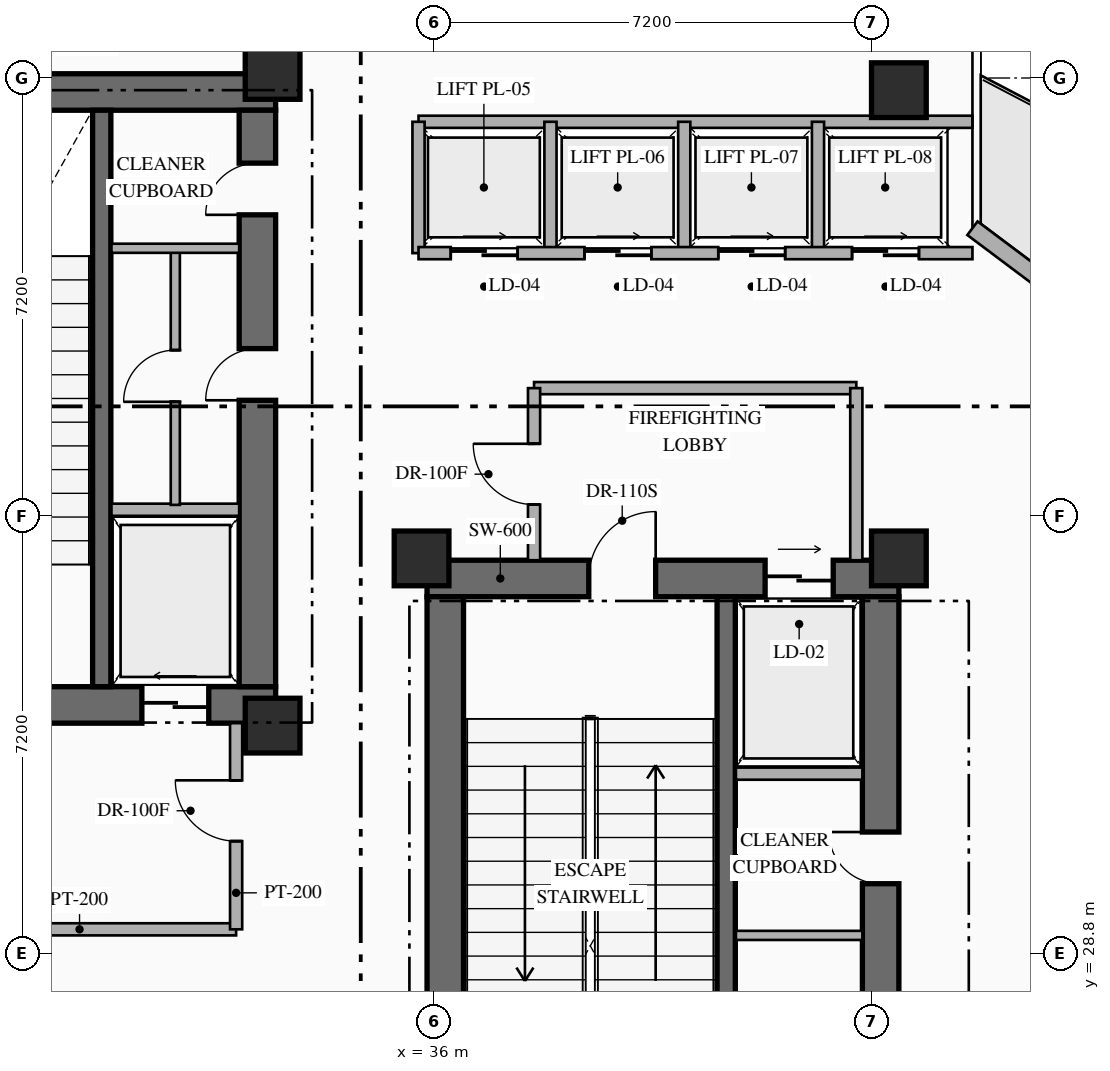
"""IFC4 building model, lengths in metres.
Left out: names, types, materials, properties, quantities, classifications, styles, units other than length and angle.
Written with IfcOpenShell. Run it as: python <this file> out.ifc"""

import sys

from ifc_helpers import new_model, si_unit, direction, frame, frame_2d, origin, origin_2d, place, context, subcontext, project, spatial, rectangle, extrude, element, fill, save


model = new_model("IFC4")
c1 = context("Model", 3, precision=1e-05, world=origin(), true_north=direction((0.0, 1.0)))
c2 = subcontext(c1, "Body", "Model", "MODEL_VIEW")
j1 = project(units=[si_unit("LENGTHUNIT", "METRE"), si_unit("PLANEANGLEUNIT", "RADIAN")], contexts=[c1])
p1 = place(None, origin())
s1 = spatial("IfcSite", under=j1, at=p1, CompositionType="ELEMENT")
p2 = place(p1, origin())
s2 = spatial("IfcBuilding", under=s1, at=p2, CompositionType="ELEMENT")
p3 = place(p2, frame((0.0, 0.0, 96.45)))
s3 = spatial("IfcBuildingStorey", under=s2, at=p3, CompositionType="ELEMENT", Elevation=96.45)
p4 = place(p3, frame((25.62, 32.89, 0.0), z_axis=(0.0, 0.0, 1.0), x_axis=(1.0, 0.0, 0.0)))
e1 = element("IfcWall", 1, at=p4, inside=s3, PredefinedType="SHEAR", context=c2, shape_type="SweptSolid", body=[
    extrude(rectangle(XDim=7.78, YDim=0.6, at=frame_2d((3.89, 0.0))), origin(), (0.0, 0.0, 1.0), 4.8),
])
p5 = place(p4, frame((2.83, 0.0, 0.0)))
e2 = element("IfcOpeningElement", 2, at=p5, cuts=e1, PredefinedType="OPENING", context=c2, shape_type="SweptSolid", body=[
    extrude(rectangle(XDim=1.1, YDim=2.2, at=frame_2d((0.55, 1.1))), frame((0.0, 0.31, 0.0), z_axis=(0.0, -1.0, 0.0), x_axis=(1.0, 0.0, 0.0)), (0.0, 0.0, 1.0), 0.62),
])
p6 = place(p4, frame((5.58, 0.0, 0.0)))
e3 = element("IfcOpeningElement", 3, at=p6, cuts=e1, PredefinedType="OPENING", context=c2, shape_type="SweptSolid", body=[
    extrude(rectangle(XDim=1.1, YDim=2.15, at=frame_2d((0.55, 1.075))), frame((0.0, 0.31, 0.0), z_axis=(0.0, -1.0, 0.0), x_axis=(1.0, 0.0, 0.0)), (0.0, 0.0, 1.0), 0.62),
])
p7 = place(p3, frame((25.62, 42.97, 0.0), z_axis=(0.0, 0.0, 1.0), x_axis=(1.0, 0.0, 0.0)))
e4 = element("IfcWall", 4, at=p7, inside=s3, PredefinedType="SHEAR", context=c2, shape_type="SweptSolid", body=[
    extrude(rectangle(XDim=7.78, YDim=0.6, at=frame_2d((3.89, 0.0))), origin(), (0.0, 0.0, 1.0), 4.8),
])
p8 = place(p3, frame((33.1, 33.19, 0.0), z_axis=(0.0, 0.0, 1.0), x_axis=(0.0, 1.0, 0.0)))
e5 = element("IfcWall", 5, at=p8, inside=s3, PredefinedType="SHEAR", context=c2, shape_type="SweptSolid", body=[
    extrude(rectangle(XDim=9.48, YDim=0.6, at=frame_2d((4.74, 0.0))), origin(), (0.0, 0.0, 1.0), 4.8),
])
p9 = place(p8, frame((4.71, 0.0, 0.0)))
e6 = element("IfcOpeningElement", 6, at=p9, cuts=e5, PredefinedType="OPENING", context=c2, shape_type="SweptSolid", body=[
    extrude(rectangle(XDim=0.85, YDim=2.08, at=frame_2d((0.425, 1.04))), frame((0.0, 0.31, 0.0), z_axis=(0.0, -1.0, 0.0), x_axis=(1.0, 0.0, 0.0)), (0.0, 0.0, 1.0), 0.62),
])
p10 = place(p8, frame((7.76, 0.0, 0.0)))
e7 = element("IfcOpeningElement", 7, at=p10, cuts=e5, PredefinedType="OPENING", context=c2, shape_type="SweptSolid", body=[
    extrude(rectangle(XDim=0.85, YDim=2.08, at=frame_2d((0.425, 1.04))), frame((0.0, 0.31, 0.0), z_axis=(0.0, -1.0, 0.0), x_axis=(1.0, 0.0, 0.0)), (0.0, 0.0, 1.0), 0.62),
])
p11 = place(p3, frame((30.54, 33.19, 0.0), z_axis=(0.0, 0.0, 1.0), x_axis=(0.0, 1.0, 0.0)))
e8 = element("IfcWall", 8, at=p11, inside=s3, PredefinedType="SHEAR", context=c2, shape_type="SweptSolid", body=[
    extrude(rectangle(XDim=9.48, YDim=0.3, at=frame_2d((4.74, 0.0))), origin(), (0.0, 0.0, 1.0), 4.8),
])
p12 = place(p3, frame((35.89, 34.97, 0.0), z_axis=(0.0, 0.0, 1.0), x_axis=(1.0, 0.0, 0.0)))
e9 = element("IfcWall", 9, at=p12, inside=s3, PredefinedType="SHEAR", context=c2, shape_type="SweptSolid", body=[
    extrude(rectangle(XDim=7.76, YDim=0.6, at=frame_2d((3.88, 0.0))), origin(), (0.0, 0.0, 1.0), 4.8),
])
p13 = place(p12, frame((2.66, 0.0, 0.0)))
e10 = element("IfcOpeningElement", 10, at=p13, cuts=e9, PredefinedType="OPENING", context=c2, shape_type="SweptSolid", body=[
    extrude(rectangle(XDim=1.1, YDim=2.2, at=frame_2d((0.55, 1.1))), frame((0.0, 0.31, 0.0), z_axis=(0.0, -1.0, 0.0), x_axis=(1.0, 0.0, 0.0)), (0.0, 0.0, 1.0), 0.62),
])
p14 = place(p12, frame((5.56, 0.0, 0.0)))
e11 = element("IfcOpeningElement", 11, at=p14, cuts=e9, PredefinedType="OPENING", context=c2, shape_type="SweptSolid", body=[
    extrude(rectangle(XDim=1.12, YDim=2.15, at=frame_2d((0.56, 1.075))), frame((0.0, 0.31, 0.0), z_axis=(0.0, -1.0, 0.0), x_axis=(1.0, 0.0, 0.0)), (0.0, 0.0, 1.0), 0.62),
])
p15 = place(p3, frame((36.19, 25.19, 0.0), z_axis=(0.0, 0.0, 1.0), x_axis=(0.0, 1.0, 0.0)))
e12 = element("IfcWall", 12, at=p15, inside=s3, PredefinedType="SHEAR", context=c2, shape_type="SweptSolid", body=[
    extrude(rectangle(XDim=9.48, YDim=0.6, at=frame_2d((4.74, 0.0))), origin(), (0.0, 0.0, 1.0), 4.8),
])
p16 = place(p3, frame((43.35, 25.19, 0.0), z_axis=(0.0, 0.0, 1.0), x_axis=(0.0, 1.0, 0.0)))
e13 = element("IfcWall", 13, at=p16, inside=s3, PredefinedType="SHEAR", context=c2, shape_type="SweptSolid", body=[
    extrude(rectangle(XDim=9.48, YDim=0.6, at=frame_2d((4.74, 0.0))), origin(), (0.0, 0.0, 1.0), 4.8),
])
p17 = place(p16, frame((1.51, 0.0, 0.0)))
e14 = element("IfcOpeningElement", 14, at=p17, cuts=e13, PredefinedType="OPENING", context=c2, shape_type="SweptSolid", body=[
    extrude(rectangle(XDim=0.85, YDim=2.08, at=frame_2d((0.425, 1.04))), frame((0.0, 0.31, 0.0), z_axis=(0.0, -1.0, 0.0), x_axis=(1.0, 0.0, 0.0)), (0.0, 0.0, 1.0), 0.62),
])
p18 = place(p16, frame((4.76, 0.0, 0.0)))
e15 = element("IfcOpeningElement", 15, at=p18, cuts=e13, PredefinedType="OPENING", context=c2, shape_type="SweptSolid", body=[
    extrude(rectangle(XDim=0.85, YDim=2.08, at=frame_2d((0.425, 1.04))), frame((0.0, 0.31, 0.0), z_axis=(0.0, -1.0, 0.0), x_axis=(1.0, 0.0, 0.0)), (0.0, 0.0, 1.0), 0.62),
])
p19 = place(p3, frame((40.81, 25.19, 0.0), z_axis=(0.0, 0.0, 1.0), x_axis=(0.0, 1.0, 0.0)))
e16 = element("IfcWall", 16, at=p19, inside=s3, PredefinedType="SHEAR", context=c2, shape_type="SweptSolid", body=[
    extrude(rectangle(XDim=9.48, YDim=0.3, at=frame_2d((4.74, 0.0))), origin(), (0.0, 0.0, 1.0), 4.8),
])
for number, where, z_axis, x_axis in (
    (17, (33.35, 32.55, 0.0), (0.0, 0.0, 1.0), (1.0, 0.0, 0.0)),
    (18, (33.35, 43.3, 0.0), (0.0, 0.0, 1.0), (1.0, 0.0, 0.0)),
    (19, (35.8, 35.3, 0.0), (0.0, 0.0, 1.0), (1.0, 0.0, 0.0)),
    (20, (43.65, 35.3, 0.0), (0.0, 0.0, 1.0), (1.0, 0.0, 0.0)),
    (21, (43.65, 43.0, 0.0), (0.0, 0.0, 1.0), (1.0, 0.0, 0.0)),
):
    element("IfcColumn", number, at=place(p3, frame(where, z_axis=z_axis, x_axis=x_axis)), inside=s3, PredefinedType="COLUMN", context=c2, shape_type="SweptSolid", body=[
        extrude(rectangle(XDim=0.9, YDim=0.9, at=origin_2d()), origin(), (0.0, 0.0, 1.0), 4.8),
    ])
p20 = place(p3, frame((44.86, 40.73, 0.0), z_axis=(0.0, 0.0, 1.0), x_axis=(0.800006902154, -0.599990797017, 0.0)))
e22 = element("IfcWall", 22, at=p20, inside=s3, PredefinedType="STANDARD", context=c2, shape_type="SweptSolid", body=[
    extrude(rectangle(XDim=29.712, YDim=0.28, at=frame_2d((14.856, 0.0))), origin(), (0.0, 0.0, 1.0), 4.55),
])
p21 = place(p20, frame((14.249, 0.0, 0.0)))
e23 = element("IfcOpeningElement", 23, at=p21, cuts=e22, PredefinedType="OPENING", context=c2, shape_type="SweptSolid", body=[
    extrude(rectangle(XDim=1.1, YDim=2.2, at=frame_2d((0.55, 1.1))), frame((0.0, 0.15, 0.0), z_axis=(0.0, -1.0, 0.0), x_axis=(1.0, 0.0, 0.0)), (0.0, 0.0, 1.0), 0.3),
])
p22 = place(p20, frame((6.528, 0.0, 0.85)))
e24 = element("IfcOpeningElement", 24, at=p22, cuts=e22, PredefinedType="OPENING", context=c2, shape_type="SweptSolid", body=[
    extrude(rectangle(XDim=1.8, YDim=2.1, at=frame_2d((0.9, 1.05))), frame((0.0, 0.15, 0.0), z_axis=(0.0, -1.0, 0.0), x_axis=(1.0, 0.0, 0.0)), (0.0, 0.0, 1.0), 0.3),
])
p23 = place(p20, frame((21.384, 0.0, 0.85)))
e25 = element("IfcOpeningElement", 25, at=p23, cuts=e22, PredefinedType="OPENING", context=c2, shape_type="SweptSolid", body=[
    extrude(rectangle(XDim=1.8, YDim=2.1, at=frame_2d((0.9, 1.05))), frame((0.0, 0.15, 0.0), z_axis=(0.0, -1.0, 0.0), x_axis=(1.0, 0.0, 0.0)), (0.0, 0.0, 1.0), 0.3),
])
p24 = place(p3, frame((30.7, 36.1, 0.0), z_axis=(0.0, 0.0, 1.0), x_axis=(1.0, 0.0, 0.0)))
e26 = element("IfcWall", 26, at=p24, inside=s3, PredefinedType="STANDARD", context=c2, shape_type="SweptSolid", body=[
    extrude(rectangle(XDim=2.1, YDim=0.2, at=frame_2d((1.05, 0.0))), origin(), (0.0, 0.0, 1.0), 4.55),
])
p25 = place(p3, frame((31.75, 36.18, 0.0), z_axis=(0.0, 0.0, 1.0), x_axis=(0.0, 1.0, 0.0)))
e27 = element("IfcWall", 27, at=p25, inside=s3, PredefinedType="PARTITIONING", context=c2, shape_type="SweptSolid", body=[
    extrude(rectangle(XDim=4.24, YDim=0.15, at=frame_2d((2.12, 0.0))), origin(), (0.0, 0.0, 1.0), 4.55),
])
p26 = place(p25, frame((1.695, 0.0, 0.0)))
e28 = element("IfcOpeningElement", 28, at=p26, cuts=e27, PredefinedType="OPENING", context=c2, shape_type="SweptSolid", body=[
    extrude(rectangle(XDim=0.85, YDim=2.08, at=frame_2d((0.425, 1.04))), frame((0.0, 0.085, 0.0), z_axis=(0.0, -1.0, 0.0), x_axis=(1.0, 0.0, 0.0)), (0.0, 0.0, 1.0), 0.17),
])
p27 = place(p3, frame((30.7, 40.4, 0.0), z_axis=(0.0, 0.0, 1.0), x_axis=(1.0, 0.0, 0.0)))
e29 = element("IfcWall", 29, at=p27, inside=s3, PredefinedType="PARTITIONING", context=c2, shape_type="SweptSolid", body=[
    extrude(rectangle(XDim=2.1, YDim=0.15, at=frame_2d((1.05, 0.0))), origin(), (0.0, 0.0, 1.0), 4.55),
])
p28 = place(p3, frame((40.97, 31.76, 0.0), z_axis=(0.0, 0.0, 1.0), x_axis=(1.0, 0.0, 0.0)))
e30 = element("IfcWall", 30, at=p28, inside=s3, PredefinedType="STANDARD", context=c2, shape_type="SweptSolid", body=[
    extrude(rectangle(XDim=2.08, YDim=0.2, at=frame_2d((1.04, 0.0))), origin(), (0.0, 0.0, 1.0), 4.55),
])
p29 = place(p3, frame((40.97, 29.1, 0.0), z_axis=(0.0, 0.0, 1.0), x_axis=(1.0, 0.0, 0.0)))
e31 = element("IfcWall", 31, at=p29, inside=s3, PredefinedType="PARTITIONING", context=c2, shape_type="SweptSolid", body=[
    extrude(rectangle(XDim=2.08, YDim=0.15, at=frame_2d((1.04, 0.0))), origin(), (0.0, 0.0, 1.0), 4.55),
])
p30 = place(p3, frame((27.6, 29.2, 0.0), z_axis=(0.0, 0.0, 1.0), x_axis=(1.0, 0.0, 0.0)))
e32 = element("IfcWall", 32, at=p30, inside=s3, PredefinedType="STANDARD", context=c2, shape_type="SweptSolid", body=[
    extrude(rectangle(XDim=5.15, YDim=0.2, at=frame_2d((2.575, 0.0))), origin(), (0.0, 0.0, 1.0), 4.55),
])
p31 = place(p3, frame((32.75, 29.2, 0.0), z_axis=(0.0, 0.0, 1.0), x_axis=(0.0, 1.0, 0.0)))
e33 = element("IfcWall", 33, at=p31, inside=s3, PredefinedType="STANDARD", context=c2, shape_type="SweptSolid", body=[
    extrude(rectangle(XDim=3.39, YDim=0.2, at=frame_2d((1.695, 0.0))), origin(), (0.0, 0.0, 1.0), 4.55),
])
p32 = place(p31, frame((1.45, 0.0, 0.0)))
e34 = element("IfcOpeningElement", 34, at=p32, cuts=e33, PredefinedType="OPENING", context=c2, shape_type="SweptSolid", body=[
    extrude(rectangle(XDim=1.0, YDim=2.2, at=frame_2d((0.5, 1.1))), frame((0.0, 0.11, 0.0), z_axis=(0.0, -1.0, 0.0), x_axis=(1.0, 0.0, 0.0)), (0.0, 0.0, 1.0), 0.22),
])
p33 = place(p3, frame((37.65, 38.1, 0.0), z_axis=(0.0, 0.0, 1.0), x_axis=(1.0, 0.0, 0.0)))
e35 = element("IfcWall", 35, at=p33, inside=s3, PredefinedType="STANDARD", context=c2, shape_type="SweptSolid", body=[
    extrude(rectangle(XDim=5.3, YDim=0.2, at=frame_2d((2.65, 0.0))), origin(), (0.0, 0.0, 1.0), 4.55),
])
p34 = place(p3, frame((42.95, 35.27, 0.0), z_axis=(0.0, 0.0, 1.0), x_axis=(0.0, 1.0, 0.0)))
e36 = element("IfcWall", 36, at=p34, inside=s3, PredefinedType="STANDARD", context=c2, shape_type="SweptSolid", body=[
    extrude(rectangle(XDim=2.83, YDim=0.2, at=frame_2d((1.415, 0.0))), origin(), (0.0, 0.0, 1.0), 4.55),
])
p35 = place(p3, frame((37.65, 35.27, 0.0), z_axis=(0.0, 0.0, 1.0), x_axis=(0.0, 1.0, 0.0)))
e37 = element("IfcWall", 37, at=p35, inside=s3, PredefinedType="STANDARD", context=c2, shape_type="SweptSolid", body=[
    extrude(rectangle(XDim=2.83, YDim=0.2, at=frame_2d((1.415, 0.0))), origin(), (0.0, 0.0, 1.0), 4.55),
])
p36 = place(p35, frame((0.915, 0.0, 0.0)))
e38 = element("IfcOpeningElement", 38, at=p36, cuts=e37, PredefinedType="OPENING", context=c2, shape_type="SweptSolid", body=[
    extrude(rectangle(XDim=1.0, YDim=2.2, at=frame_2d((0.5, 1.1))), frame((0.0, 0.11, 0.0), z_axis=(0.0, -1.0, 0.0), x_axis=(1.0, 0.0, 0.0)), (0.0, 0.0, 1.0), 0.22),
])
p37 = place(p3, frame((35.75, 42.48, 0.0), z_axis=(0.0, 0.0, 1.0), x_axis=(1.0, 0.0, 0.0)))
e39 = element("IfcWall", 39, at=p37, inside=s3, PredefinedType="STANDARD", context=c2, shape_type="SweptSolid", body=[
    extrude(rectangle(XDim=9.11, YDim=0.2, at=frame_2d((4.555, 0.0))), origin(), (0.0, 0.0, 1.0), 4.55),
])
for number, where, z_axis, x_axis in (
    (40, (35.75, 40.32, 0.0), (0.0, 0.0, 1.0), (0.0, 1.0, 0.0)),
    (41, (37.92, 40.32, 0.0), (0.0, 0.0, 1.0), (0.0, 1.0, 0.0)),
    (42, (40.12, 40.32, 0.0), (0.0, 0.0, 1.0), (0.0, 1.0, 0.0)),
    (43, (42.32, 40.32, 0.0), (0.0, 0.0, 1.0), (0.0, 1.0, 0.0)),
):
    element("IfcWall", number, at=place(p3, frame(where, z_axis=z_axis, x_axis=x_axis)), inside=s3, PredefinedType="STANDARD", context=c2, shape_type="SweptSolid", body=[
        extrude(rectangle(XDim=2.16, YDim=0.2, at=frame_2d((1.08, 0.0))), origin(), (0.0, 0.0, 1.0), 4.55),
    ])
p38 = place(p3, frame((35.75, 40.32, 0.0), z_axis=(0.0, 0.0, 1.0), x_axis=(1.0, 0.0, 0.0)))
e44 = element("IfcWall", 44, at=p38, inside=s3, PredefinedType="STANDARD", context=c2, shape_type="SweptSolid", body=[
    extrude(rectangle(XDim=9.11, YDim=0.2, at=frame_2d((4.555, 0.0))), origin(), (0.0, 0.0, 1.0), 4.55),
])
p39 = place(p38, frame((0.53, 0.0, 0.0)))
e45 = element("IfcOpeningElement", 45, at=p39, cuts=e44, PredefinedType="OPENING", context=c2, shape_type="SweptSolid", body=[
    extrude(rectangle(XDim=1.1, YDim=2.18, at=frame_2d((0.55, 1.09))), frame((0.0, 0.11, 0.0), z_axis=(0.0, -1.0, 0.0), x_axis=(1.0, 0.0, 0.0)), (0.0, 0.0, 1.0), 0.22),
])
p40 = place(p38, frame((2.73, 0.0, 0.0)))
e46 = element("IfcOpeningElement", 46, at=p40, cuts=e44, PredefinedType="OPENING", context=c2, shape_type="SweptSolid", body=[
    extrude(rectangle(XDim=1.1, YDim=2.18, at=frame_2d((0.55, 1.09))), frame((0.0, 0.11, 0.0), z_axis=(0.0, -1.0, 0.0), x_axis=(1.0, 0.0, 0.0)), (0.0, 0.0, 1.0), 0.22),
])
p41 = place(p38, frame((4.93, 0.0, 0.0)))
e47 = element("IfcOpeningElement", 47, at=p41, cuts=e44, PredefinedType="OPENING", context=c2, shape_type="SweptSolid", body=[
    extrude(rectangle(XDim=1.1, YDim=2.18, at=frame_2d((0.55, 1.09))), frame((0.0, 0.11, 0.0), z_axis=(0.0, -1.0, 0.0), x_axis=(1.0, 0.0, 0.0)), (0.0, 0.0, 1.0), 0.22),
])
p42 = place(p38, frame((7.13, 0.0, 0.0)))
e48 = element("IfcOpeningElement", 48, at=p42, cuts=e44, PredefinedType="OPENING", context=c2, shape_type="SweptSolid", body=[
    extrude(rectangle(XDim=1.1, YDim=2.18, at=frame_2d((0.55, 1.09))), frame((0.0, 0.11, 0.0), z_axis=(0.0, -1.0, 0.0), x_axis=(1.0, 0.0, 0.0)), (0.0, 0.0, 1.0), 0.22),
])
p43 = place(p3, frame((45.32, 22.56, 0.0), z_axis=(0.0, 0.0, 1.0), x_axis=(0.599997279769, 0.800002040166, 0.0)))
e49 = element("IfcWall", 49, at=p43, inside=s3, PredefinedType="PARTITIONING", context=c2, shape_type="SweptSolid", body=[
    extrude(rectangle(XDim=14.36, YDim=0.15, at=frame_2d((7.18, 0.0))), origin(), (0.0, 0.0, 1.0), 4.55),
])
p44 = place(p43, frame((6.705, 0.0, 0.0)))
e50 = element("IfcOpeningElement", 50, at=p44, cuts=e49, PredefinedType="OPENING", context=c2, shape_type="SweptSolid", body=[
    extrude(rectangle(XDim=0.95, YDim=2.15, at=frame_2d((0.475, 1.075))), frame((0.0, 0.085, 0.0), z_axis=(0.0, -1.0, 0.0), x_axis=(1.0, 0.0, 0.0)), (0.0, 0.0, 1.0), 0.17),
])
p45 = place(p6, origin())
e51 = element("IfcDoor", 51, at=p45, inside=s3, OperationType="SLIDING_TO_LEFT", PredefinedType="USERDEFINED", context=c2, shape_type="SweptSolid", body=[
    extrude(rectangle(XDim=1.1, YDim=2.15, at=frame_2d((0.55, 1.075))), frame((0.0, 0.025, 0.0), z_axis=(0.0, -1.0, 0.0), x_axis=(1.0, 0.0, 0.0)), (0.0, 0.0, 1.0), 0.05),
])
fill(e3, e51)
p46 = place(p13, origin())
e52 = element("IfcDoor", 52, at=p46, inside=s3, OperationType="SINGLE_SWING_RIGHT", PredefinedType="DOOR", context=c2, shape_type="SweptSolid", body=[
    extrude(rectangle(XDim=1.1, YDim=2.2, at=frame_2d((0.55, 1.1))), frame((0.0, 0.025, 0.0), z_axis=(0.0, -1.0, 0.0), x_axis=(1.0, 0.0, 0.0)), (0.0, 0.0, 1.0), 0.05),
])
fill(e10, e52)
p47 = place(p14, origin())
e53 = element("IfcDoor", 53, at=p47, inside=s3, OperationType="SLIDING_TO_RIGHT", PredefinedType="USERDEFINED", context=c2, shape_type="SweptSolid", body=[
    extrude(rectangle(XDim=1.12, YDim=2.15, at=frame_2d((0.56, 1.075))), frame((0.0, 0.025, 0.0), z_axis=(0.0, -1.0, 0.0), x_axis=(1.0, 0.0, 0.0)), (0.0, 0.0, 1.0), 0.05),
])
fill(e11, e53)
p48 = place(p9, origin())
e54 = element("IfcDoor", 54, at=p48, inside=s3, OperationType="SINGLE_SWING_LEFT", PredefinedType="DOOR", context=c2, shape_type="SweptSolid", body=[
    extrude(rectangle(XDim=0.85, YDim=2.08, at=frame_2d((0.425, 1.04))), frame((0.0, 0.025, 0.0), z_axis=(0.0, -1.0, 0.0), x_axis=(1.0, 0.0, 0.0)), (0.0, 0.0, 1.0), 0.05),
])
fill(e6, e54)
p49 = place(p10, origin())
e55 = element("IfcDoor", 55, at=p49, inside=s3, OperationType="SINGLE_SWING_LEFT", PredefinedType="DOOR", context=c2, shape_type="SweptSolid", body=[
    extrude(rectangle(XDim=0.85, YDim=2.08, at=frame_2d((0.425, 1.04))), frame((0.0, 0.025, 0.0), z_axis=(0.0, -1.0, 0.0), x_axis=(1.0, 0.0, 0.0)), (0.0, 0.0, 1.0), 0.05),
])
fill(e7, e55)
p50 = place(p18, origin())
e56 = element("IfcDoor", 56, at=p50, inside=s3, OperationType="SINGLE_SWING_RIGHT", PredefinedType="DOOR", context=c2, shape_type="SweptSolid", body=[
    extrude(rectangle(XDim=0.85, YDim=2.08, at=frame_2d((0.425, 1.04))), frame((0.0, 0.025, 0.0), z_axis=(0.0, -1.0, 0.0), x_axis=(1.0, 0.0, 0.0)), (0.0, 0.0, 1.0), 0.05),
])
fill(e15, e56)
p51 = place(p26, origin())
e57 = element("IfcDoor", 57, at=p51, inside=s3, OperationType="SINGLE_SWING_LEFT", PredefinedType="DOOR", context=c2, shape_type="SweptSolid", body=[
    extrude(rectangle(XDim=0.85, YDim=2.08, at=frame_2d((0.425, 1.04))), frame((0.0, 0.025, 0.0), z_axis=(0.0, -1.0, 0.0), x_axis=(1.0, 0.0, 0.0)), (0.0, 0.0, 1.0), 0.05),
])
fill(e28, e57)
p52 = place(p32, origin())
e58 = element("IfcDoor", 58, at=p52, inside=s3, OperationType="SINGLE_SWING_RIGHT", PredefinedType="DOOR", context=c2, shape_type="SweptSolid", body=[
    extrude(rectangle(XDim=1.0, YDim=2.2, at=frame_2d((0.5, 1.1))), frame((0.0, 0.025, 0.0), z_axis=(0.0, -1.0, 0.0), x_axis=(1.0, 0.0, 0.0)), (0.0, 0.0, 1.0), 0.05),
])
fill(e34, e58)
p53 = place(p36, origin())
e59 = element("IfcDoor", 59, at=p53, inside=s3, OperationType="SINGLE_SWING_RIGHT", PredefinedType="DOOR", context=c2, shape_type="SweptSolid", body=[
    extrude(rectangle(XDim=1.0, YDim=2.2, at=frame_2d((0.5, 1.1))), frame((0.0, 0.025, 0.0), z_axis=(0.0, -1.0, 0.0), x_axis=(1.0, 0.0, 0.0)), (0.0, 0.0, 1.0), 0.05),
])
fill(e38, e59)
p54 = place(p39, origin())
e60 = element("IfcDoor", 60, at=p54, inside=s3, OperationType="SLIDING_TO_RIGHT", PredefinedType="USERDEFINED", context=c2, shape_type="SweptSolid", body=[
    extrude(rectangle(XDim=1.1, YDim=2.18, at=frame_2d((0.55, 1.09))), frame((0.0, 0.025, 0.0), z_axis=(0.0, -1.0, 0.0), x_axis=(1.0, 0.0, 0.0)), (0.0, 0.0, 1.0), 0.05),
])
fill(e45, e60)
p55 = place(p40, origin())
e61 = element("IfcDoor", 61, at=p55, inside=s3, OperationType="SLIDING_TO_RIGHT", PredefinedType="USERDEFINED", context=c2, shape_type="SweptSolid", body=[
    extrude(rectangle(XDim=1.1, YDim=2.18, at=frame_2d((0.55, 1.09))), frame((0.0, 0.025, 0.0), z_axis=(0.0, -1.0, 0.0), x_axis=(1.0, 0.0, 0.0)), (0.0, 0.0, 1.0), 0.05),
])
fill(e46, e61)
p56 = place(p41, origin())
e62 = element("IfcDoor", 62, at=p56, inside=s3, OperationType="SLIDING_TO_RIGHT", PredefinedType="USERDEFINED", context=c2, shape_type="SweptSolid", body=[
    extrude(rectangle(XDim=1.1, YDim=2.18, at=frame_2d((0.55, 1.09))), frame((0.0, 0.025, 0.0), z_axis=(0.0, -1.0, 0.0), x_axis=(1.0, 0.0, 0.0)), (0.0, 0.0, 1.0), 0.05),
])
fill(e47, e62)
p57 = place(p42, origin())
e63 = element("IfcDoor", 63, at=p57, inside=s3, OperationType="SLIDING_TO_RIGHT", PredefinedType="USERDEFINED", context=c2, shape_type="SweptSolid", body=[
    extrude(rectangle(XDim=1.1, YDim=2.18, at=frame_2d((0.55, 1.09))), frame((0.0, 0.025, 0.0), z_axis=(0.0, -1.0, 0.0), x_axis=(1.0, 0.0, 0.0)), (0.0, 0.0, 1.0), 0.05),
])
fill(e48, e63)
save(model, sys.argv[1])
